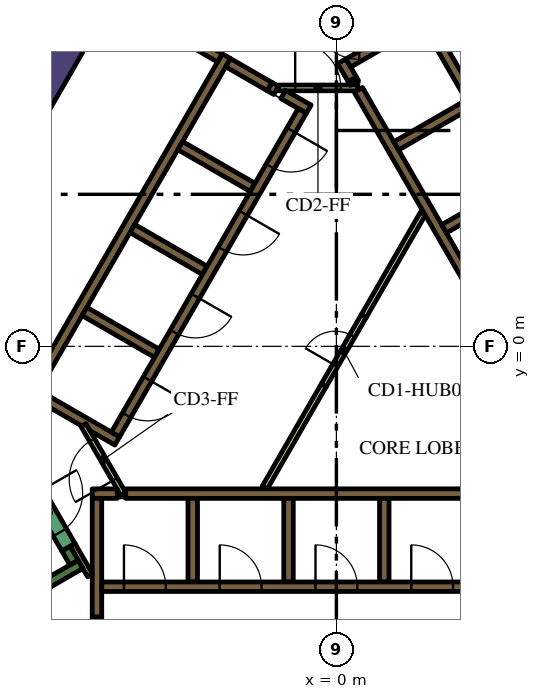
"""IFC4 building model, lengths in metres.
Left out: names, types, materials, properties, quantities, classifications, styles, units other than length and angle.
Written with IfcOpenShell. Run it as: python <this file> out.ifc"""

import sys

from ifc_helpers import new_model, si_unit, direction, frame, frame_2d, origin, place, context, subcontext, project, spatial, polyline, rectangle, outline, extrude, element, fill, save


model = new_model("IFC4")
c1 = context("Model", 3, precision=1e-05, world=origin(), true_north=direction((0.0, 1.0)))
c2 = subcontext(c1, "Body", "Model", "MODEL_VIEW")
j1 = project(units=[si_unit("LENGTHUNIT", "METRE"), si_unit("PLANEANGLEUNIT", "RADIAN")], contexts=[c1])
p1 = place(None, origin())
s1 = spatial("IfcSite", under=j1, at=p1, CompositionType="ELEMENT")
p2 = place(p1, origin())
s2 = spatial("IfcBuilding", under=s1, at=p2, CompositionType="ELEMENT")
p3 = place(p2, frame((0.0, 0.0, 158.4)))
s3 = spatial("IfcBuildingStorey", under=s2, at=p3, CompositionType="ELEMENT", Elevation=158.4)
p4 = place(p3, frame((8.279, 5.761, 0.0), z_axis=(0.0, 0.0, 1.0), x_axis=(-0.500010359015, 0.866019422922, 0.0)))
e1 = element("IfcWall", 1, at=p4, inside=s3, PredefinedType="SOLIDWALL", context=c2, shape_type="SweptSolid", body=[
    extrude(rectangle(XDim=12.528, YDim=0.8, at=frame_2d((6.264, 0.0))), origin(), (0.0, 0.0, 1.0), 4.2),
])
p5 = place(p3, frame((-12.668, -1.842, 0.0), z_axis=(0.0, 0.0, 1.0), x_axis=(0.500003640647, 0.866023301845, 0.0)))
e2 = element("IfcWall", 2, at=p5, inside=s3, PredefinedType="SOLIDWALL", context=c2, shape_type="SweptSolid", body=[
    extrude(rectangle(XDim=15.858, YDim=0.8, at=frame_2d((7.929, 0.0))), origin(), (0.0, 0.0, 1.0), 4.2),
])
p6 = place(p3, frame((-12.84, -9.261, 0.0), z_axis=(0.0, 0.0, 1.0), x_axis=(0.866016039709, 0.500016218704, 0.0)))
e3 = element("IfcWall", 3, at=p6, inside=s3, PredefinedType="SOLIDWALL", context=c2, shape_type="SweptSolid", body=[
    extrude(rectangle(XDim=7.05, YDim=0.25, at=frame_2d((3.525, 0.0))), origin(), (0.0, 0.0, 1.0), 4.2),
])
p7 = place(p3, frame((-6.905, -5.69, 0.0), z_axis=(0.0, 0.0, 1.0), x_axis=(-0.500402024738, 0.865793170242, 0.0)))
e4 = element("IfcWall", 4, at=p7, inside=s3, PredefinedType="SOLIDWALL", context=c2, shape_type="SweptSolid", body=[
    extrude(rectangle(XDim=0.425, YDim=0.25, at=frame_2d((0.212, 0.0))), origin(), (0.0, 0.0, 1.0), 4.2),
])
p8 = place(p3, frame((-5.545, -3.875, 0.0), z_axis=(0.0, 0.0, 1.0), x_axis=(1.0, 0.0, 0.0)))
e5 = element("IfcWall", 5, at=p8, inside=s3, PredefinedType="SOLIDWALL", context=c2, shape_type="SweptSolid", body=[
    extrude(rectangle(XDim=11.97, YDim=0.25, at=frame_2d((5.985, 0.0))), origin(), (0.0, 0.0, 1.0), 4.2),
])
p9 = place(p3, frame((-6.425, -3.875, 0.0), z_axis=(0.0, 0.0, 1.0), x_axis=(1.0, 0.0, 0.0)))
e6 = element("IfcWall", 6, at=p9, inside=s3, PredefinedType="SOLIDWALL", context=c2, shape_type="SweptSolid", body=[
    extrude(rectangle(XDim=0.658, YDim=0.25, at=frame_2d((0.329, 0.0))), origin(), (0.0, 0.0, 1.0), 4.2),
])
for number, where, z_axis, x_axis in (
    (7, (1.26, -4.0, 0.0), (0.0, 0.0, 1.0), (0.0, -1.0, 0.0)),
    (8, (-1.26, -4.0, 0.0), (0.0, 0.0, 1.0), (0.0, -1.0, 0.0)),
    (9, (-3.78, -4.0, 0.0), (0.0, 0.0, 1.0), (0.0, -1.0, 0.0)),
):
    element("IfcWall", number, at=place(p3, frame(where, z_axis=z_axis, x_axis=x_axis)), inside=s3, PredefinedType="SOLIDWALL", context=c2, shape_type="SweptSolid", body=[
        extrude(rectangle(XDim=2.2, YDim=0.25, at=frame_2d((1.1, 0.0))), origin(), (0.0, 0.0, 1.0), 4.2),
    ])
p10 = place(p3, frame((-6.3, -7.125, 0.0), z_axis=(0.0, 0.0, 1.0), x_axis=(0.0, 1.0, 0.0)))
e10 = element("IfcWall", 10, at=p10, inside=s3, PredefinedType="SOLIDWALL", context=c2, shape_type="SweptSolid", body=[
    extrude(rectangle(XDim=3.125, YDim=0.25, at=frame_2d((1.562, 0.0))), origin(), (0.0, 0.0, 1.0), 4.2),
])
p11 = place(p3, frame((0.473, 6.93, 0.0), z_axis=(0.0, 0.0, 1.0), x_axis=(-0.49972245349, 0.866185586049, 0.0)))
e11 = element("IfcWall", 11, at=p11, inside=s3, PredefinedType="SOLIDWALL", context=c2, shape_type="SweptSolid", body=[
    extrude(rectangle(XDim=0.11, YDim=0.25, at=frame_2d((0.055, 0.0))), origin(), (0.0, 0.0, 1.0), 4.2),
])
p12 = place(p3, frame((6.568, -3.627, 0.0), z_axis=(0.0, 0.0, 1.0), x_axis=(-0.499999455981, 0.866025717874, 0.0)))
e12 = element("IfcWall", 12, at=p12, inside=s3, PredefinedType="SOLIDWALL", context=c2, shape_type="SweptSolid", body=[
    extrude(rectangle(XDim=11.978, YDim=0.25, at=frame_2d((5.989, 0.0))), origin(), (0.0, 0.0, 1.0), 4.2),
])
p13 = place(p3, frame((0.417, 7.027, 0.0), z_axis=(0.0, 0.0, 1.0), x_axis=(-0.500210807569, 0.865903659763, 0.0)))
e13 = element("IfcWall", 13, at=p13, inside=s3, PredefinedType="SOLIDWALL", context=c2, shape_type="SweptSolid", body=[
    extrude(rectangle(XDim=0.548, YDim=0.25, at=frame_2d((0.274, 0.0))), origin(), (0.0, 0.0, 1.0), 4.2),
])
p14 = place(p3, frame((3.1, 9.064, 0.0), z_axis=(0.0, 0.0, 1.0), x_axis=(-0.866030133475, -0.499991807846, 0.0)))
e14 = element("IfcWall", 14, at=p14, inside=s3, PredefinedType="SOLIDWALL", context=c2, shape_type="SweptSolid", body=[
    extrude(rectangle(XDim=3.217, YDim=0.25, at=frame_2d((1.608, 0.0))), origin(), (0.0, 0.0, 1.0), 4.2),
])
p15 = place(p3, frame((1.574, 5.274, 0.0), z_axis=(0.0, 0.0, 1.0), x_axis=(0.866028486751, 0.499994660107, 0.0)))
e15 = element("IfcWall", 15, at=p15, inside=s3, PredefinedType="SOLIDWALL", context=c2, shape_type="SweptSolid", body=[
    extrude(rectangle(XDim=2.2, YDim=0.25, at=frame_2d((1.1, 0.0))), origin(), (0.0, 0.0, 1.0), 4.2),
])
p16 = place(p3, frame((2.834, 3.091, 0.0), z_axis=(0.0, 0.0, 1.0), x_axis=(0.866008176907, 0.50002983664, 0.0)))
e16 = element("IfcWall", 16, at=p16, inside=s3, PredefinedType="SOLIDWALL", context=c2, shape_type="SweptSolid", body=[
    extrude(rectangle(XDim=2.2, YDim=0.25, at=frame_2d((1.1, 0.0))), origin(), (0.0, 0.0, 1.0), 4.2),
])
p17 = place(p3, frame((-8.06, -1.311, 0.0), z_axis=(0.0, 0.0, 1.0), x_axis=(0.50000273126, 0.866023826885, 0.0)))
e17 = element("IfcWall", 17, at=p17, inside=s3, PredefinedType="SOLIDWALL", context=c2, shape_type="SweptSolid", body=[
    extrude(rectangle(XDim=10.33, YDim=0.25, at=frame_2d((5.165, 0.0))), origin(), (0.0, 0.0, 1.0), 4.2),
])
p18 = place(p3, frame((-1.758, 6.835, 0.0), z_axis=(0.0, 0.0, 1.0), x_axis=(0.865982457891, -0.500074377092, 0.0)))
e18 = element("IfcWall", 18, at=p18, inside=s3, PredefinedType="SOLIDWALL", context=c2, shape_type="SweptSolid", body=[
    extrude(rectangle(XDim=0.2, YDim=0.25, at=frame_2d((0.1, 0.0))), origin(), (0.0, 0.0, 1.0), 4.2),
])
p19 = place(p3, frame((-1.76, 6.836, 0.0), z_axis=(0.0, 0.0, 1.0), x_axis=(-0.865952863304, 0.500125622755, 0.0)))
e19 = element("IfcWall", 19, at=p19, inside=s3, PredefinedType="SOLIDWALL", context=c2, shape_type="SweptSolid", body=[
    extrude(rectangle(XDim=1.258, YDim=0.25, at=frame_2d((0.629, 0.0))), origin(), (0.0, 0.0, 1.0), 4.2),
])
p20 = place(p3, frame((-0.728, 6.24, 0.0), z_axis=(0.0, 0.0, 1.0), x_axis=(-0.865955664968, 0.500120771724, 0.0)))
e20 = element("IfcWall", 20, at=p20, inside=s3, PredefinedType="SOLIDWALL", context=c2, shape_type="SweptSolid", body=[
    extrude(rectangle(XDim=0.778, YDim=0.25, at=frame_2d((0.389, 0.0))), origin(), (0.0, 0.0, 1.0), 4.2),
])
for number, where, z_axis, x_axis in (
    (21, (-2.204, 4.182, 0.0), (0.0, 0.0, 1.0), (-0.866, 0.5, 0.0)),
    (22, (-5.369, 3.1, 0.0), (0.0, 0.0, 1.0), (0.866, -0.5, 0.0)),
    (23, (-4.724, -0.182, 0.0), (0.0, 0.0, 1.0), (-0.866, 0.5, 0.0)),
):
    element("IfcWall", number, at=place(p3, frame(where, z_axis=z_axis, x_axis=x_axis)), inside=s3, PredefinedType="SOLIDWALL", context=c2, shape_type="SweptSolid", body=[
        extrude(rectangle(XDim=2.2, YDim=0.25, at=frame_2d((1.1, 0.0))), origin(), (0.0, 0.0, 1.0), 4.2),
    ])
p21 = place(p3, origin())
e24 = element("IfcWall", 24, at=p21, inside=s3, PredefinedType="SOLIDWALL", context=c2, shape_type="SweptSolid", body=[
    extrude(outline(polyline([(-5.922, -2.257), (-5.922, -2.257), (-5.705, -2.382), (-5.83, -2.598), (-6.483, -2.221), (-6.591, -2.033), (-6.591, -2.033), (-6.7, -2.096), (-7.952, -1.373), (-7.827, -1.156), (-5.922, -2.257)])), origin(), (0.0, 0.0, 1.0), 4.2),
])
p22 = place(p3, frame((-3.066, 7.59, 0.0), z_axis=(0.0, 0.0, 1.0), x_axis=(-0.866081358704, 0.49990307071, 0.0)))
e25 = element("IfcWall", 25, at=p22, inside=s3, PredefinedType="SOLIDWALL", context=c2, shape_type="SweptSolid", body=[
    extrude(rectangle(XDim=0.858, YDim=0.25, at=frame_2d((0.429, 0.0))), origin(), (0.0, 0.0, 1.0), 4.2),
])
p23 = place(p3, frame((-6.48, -6.027, 0.0), z_axis=(0.0, 0.0, 1.0), x_axis=(-0.499927229454, 0.866067413802, 0.0)))
e26 = element("IfcWall", 26, at=p23, inside=s3, PredefinedType="PARTITIONING", context=c2, shape_type="SweptSolid", body=[
    extrude(rectangle(XDim=0.929, YDim=0.15, at=frame_2d((0.464, 0.0))), origin(), (0.0, 0.0, 1.0), 4.2),
])
p24 = place(p3, frame((-1.887, -3.718, 0.0), z_axis=(0.0, 0.0, 1.0), x_axis=(0.500043732237, 0.866000153493, 0.0)))
e27 = element("IfcWall", 27, at=p24, inside=s3, PredefinedType="PARTITIONING", context=c2, shape_type="SweptSolid", body=[
    extrude(rectangle(XDim=3.114, YDim=0.15, at=frame_2d((1.557, 0.0))), origin(), (0.0, 0.0, 1.0), 3.15),
])
p25 = place(p3, frame((0.72, 0.797, 0.0), z_axis=(0.0, 0.0, 1.0), x_axis=(0.499984921984, 0.866034108906, 0.0)))
e28 = element("IfcWall", 28, at=p25, inside=s3, PredefinedType="PARTITIONING", context=c2, shape_type="SweptSolid", body=[
    extrude(rectangle(XDim=3.113, YDim=0.15, at=frame_2d((1.557, 0.0))), origin(), (0.0, 0.0, 1.0), 3.15),
])
p26 = place(p3, frame((-6.175, -6.325, 0.0), z_axis=(0.0, 0.0, 1.0), x_axis=(1.0, 0.0, 0.0)))
e29 = element("IfcWall", 29, at=p26, inside=s3, PredefinedType="SOLIDWALL", context=c2, shape_type="SweptSolid", body=[
    extrude(rectangle(XDim=12.35, YDim=0.25, at=frame_2d((6.175, 0.0))), origin(), (0.0, 0.0, 1.0), 4.2),
])
p27 = place(p26, frame((0.585, 0.0, 0.0)))
e30 = element("IfcOpeningElement", 30, at=p27, cuts=e29, PredefinedType="OPENING", context=c2, shape_type="SweptSolid", body=[
    extrude(rectangle(XDim=1.1, YDim=2.1, at=frame_2d((0.55, 1.05))), frame((0.0, 0.135, 0.0), z_axis=(0.0, -1.0, 0.0), x_axis=(1.0, 0.0, 0.0)), (0.0, 0.0, 1.0), 0.27),
])
p28 = place(p26, frame((3.105, 0.0, 0.0)))
e31 = element("IfcOpeningElement", 31, at=p28, cuts=e29, PredefinedType="OPENING", context=c2, shape_type="SweptSolid", body=[
    extrude(rectangle(XDim=1.1, YDim=2.1, at=frame_2d((0.55, 1.05))), frame((0.0, 0.135, 0.0), z_axis=(0.0, -1.0, 0.0), x_axis=(1.0, 0.0, 0.0)), (0.0, 0.0, 1.0), 0.27),
])
p29 = place(p26, frame((5.625, 0.0, 0.0)))
e32 = element("IfcOpeningElement", 32, at=p29, cuts=e29, PredefinedType="OPENING", context=c2, shape_type="SweptSolid", body=[
    extrude(rectangle(XDim=1.1, YDim=2.1, at=frame_2d((0.55, 1.05))), frame((0.0, 0.135, 0.0), z_axis=(0.0, -1.0, 0.0), x_axis=(1.0, 0.0, 0.0)), (0.0, 0.0, 1.0), 0.27),
])
p30 = place(p26, frame((8.145, 0.0, 0.0)))
e33 = element("IfcOpeningElement", 33, at=p30, cuts=e29, PredefinedType="OPENING", context=c2, shape_type="SweptSolid", body=[
    extrude(rectangle(XDim=1.1, YDim=2.1, at=frame_2d((0.55, 1.05))), frame((0.0, 0.135, 0.0), z_axis=(0.0, -1.0, 0.0), x_axis=(1.0, 0.0, 0.0)), (0.0, 0.0, 1.0), 0.27),
])
p31 = place(p26, frame((10.665, 0.0, 0.0)))
e34 = element("IfcOpeningElement", 34, at=p31, cuts=e29, PredefinedType="OPENING", context=c2, shape_type="SweptSolid", body=[
    extrude(rectangle(XDim=1.1, YDim=2.1, at=frame_2d((0.55, 1.05))), frame((0.0, 0.135, 0.0), z_axis=(0.0, -1.0, 0.0), x_axis=(1.0, 0.0, 0.0)), (0.0, 0.0, 1.0), 0.27),
])
p32 = place(p3, frame((8.565, -2.185, 0.0), z_axis=(0.0, 0.0, 1.0), x_axis=(-0.499997954832, 0.866026584559, 0.0)))
e35 = element("IfcWall", 35, at=p32, inside=s3, PredefinedType="SOLIDWALL", context=c2, shape_type="SweptSolid", body=[
    extrude(rectangle(XDim=12.35, YDim=0.25, at=frame_2d((6.175, 0.0))), origin(), (0.0, 0.0, 1.0), 4.2),
])
p33 = place(p32, frame((0.585, 0.0, 0.0)))
e36 = element("IfcOpeningElement", 36, at=p33, cuts=e35, PredefinedType="OPENING", context=c2, shape_type="SweptSolid", body=[
    extrude(rectangle(XDim=1.1, YDim=2.1, at=frame_2d((0.55, 1.05))), frame((0.0, 0.135, 0.0), z_axis=(0.0, -1.0, 0.0), x_axis=(1.0, 0.0, 0.0)), (0.0, 0.0, 1.0), 0.27),
])
p34 = place(p3, frame((-0.898, 6.194, 0.0), z_axis=(0.0, 0.0, 1.0), x_axis=(-0.499996202215, -0.866027596426, 0.0)))
e37 = element("IfcWall", 37, at=p34, inside=s3, PredefinedType="SOLIDWALL", context=c2, shape_type="SweptSolid", body=[
    extrude(rectangle(XDim=9.83, YDim=0.25, at=frame_2d((4.915, 0.0))), origin(), (0.0, 0.0, 1.0), 4.2),
])
p35 = place(p34, frame((0.585, 0.0, 0.0)))
e38 = element("IfcOpeningElement", 38, at=p35, cuts=e37, PredefinedType="OPENING", context=c2, shape_type="SweptSolid", body=[
    extrude(rectangle(XDim=1.1, YDim=2.1, at=frame_2d((0.55, 1.05))), frame((0.0, 0.135, 0.0), z_axis=(0.0, -1.0, 0.0), x_axis=(1.0, 0.0, 0.0)), (0.0, 0.0, 1.0), 0.27),
])
p36 = place(p34, frame((3.105, 0.0, 0.0)))
e39 = element("IfcOpeningElement", 39, at=p36, cuts=e37, PredefinedType="OPENING", context=c2, shape_type="SweptSolid", body=[
    extrude(rectangle(XDim=1.1, YDim=2.1, at=frame_2d((0.55, 1.05))), frame((0.0, 0.135, 0.0), z_axis=(0.0, -1.0, 0.0), x_axis=(1.0, 0.0, 0.0)), (0.0, 0.0, 1.0), 0.27),
])
p37 = place(p34, frame((5.625, 0.0, 0.0)))
e40 = element("IfcOpeningElement", 40, at=p37, cuts=e37, PredefinedType="OPENING", context=c2, shape_type="SweptSolid", body=[
    extrude(rectangle(XDim=1.1, YDim=2.1, at=frame_2d((0.55, 1.05))), frame((0.0, 0.135, 0.0), z_axis=(0.0, -1.0, 0.0), x_axis=(1.0, 0.0, 0.0)), (0.0, 0.0, 1.0), 0.27),
])
p38 = place(p34, frame((8.145, 0.0, 0.0)))
e41 = element("IfcOpeningElement", 41, at=p38, cuts=e37, PredefinedType="OPENING", context=c2, shape_type="SweptSolid", body=[
    extrude(rectangle(XDim=1.1, YDim=2.1, at=frame_2d((0.55, 1.05))), frame((0.0, 0.135, 0.0), z_axis=(0.0, -1.0, 0.0), x_axis=(1.0, 0.0, 0.0)), (0.0, 0.0, 1.0), 0.27),
])
p39 = place(p3, frame((-8.103, -3.466, 0.0), z_axis=(0.0, 0.0, 1.0), x_axis=(0.500078061341, -0.865980330357, 0.0)))
e42 = element("IfcWall", 42, at=p39, inside=s3, PredefinedType="SOLIDWALL", context=c2, shape_type="SweptSolid", body=[
    extrude(rectangle(XDim=2.1, YDim=0.4, at=frame_2d((1.05, 0.0))), origin(), (0.0, 0.0, 1.0), 4.2),
])
p40 = place(p39, frame((0.45, 0.0, 0.0)))
e43 = element("IfcOpeningElement", 43, at=p40, cuts=e42, PredefinedType="OPENING", context=c2, shape_type="SweptSolid", body=[
    extrude(rectangle(XDim=1.2, YDim=2.1, at=frame_2d((0.6, 1.05))), frame((0.0, 0.21, 0.0), z_axis=(0.0, -1.0, 0.0), x_axis=(1.0, 0.0, 0.0)), (0.0, 0.0, 1.0), 0.42),
])
p41 = place(p3, frame((-6.3, -7.125, 0.0), z_axis=(0.0, 0.0, 1.0), x_axis=(0.0, -1.0, 0.0)))
e44 = element("IfcWall", 44, at=p41, inside=s3, PredefinedType="SOLIDWALL", context=c2, shape_type="SweptSolid", body=[
    extrude(rectangle(XDim=1.8, YDim=0.25, at=frame_2d((0.9, 0.0))), origin(), (0.0, 0.0, 1.0), 4.2),
])
p42 = place(p41, frame((0.45, 0.0, 0.0)))
e45 = element("IfcOpeningElement", 45, at=p42, cuts=e44, PredefinedType="OPENING", context=c2, shape_type="SweptSolid", body=[
    extrude(rectangle(XDim=0.9, YDim=2.1, at=frame_2d((0.45, 1.05))), frame((0.0, 0.135, 0.0), z_axis=(0.0, -1.0, 0.0), x_axis=(1.0, 0.0, 0.0)), (0.0, 0.0, 1.0), 0.27),
])
p43 = place(p3, frame((-0.33, -1.022, 0.0), z_axis=(0.0, 0.0, 1.0), x_axis=(0.500027713859, 0.866009402589, 0.0)))
e46 = element("IfcWall", 46, at=p43, inside=s3, PredefinedType="PARTITIONING", context=c2, shape_type="SweptSolid", body=[
    extrude(rectangle(XDim=2.1, YDim=0.15, at=frame_2d((1.05, 0.0))), origin(), (0.0, 0.0, 1.0), 3.15),
])
p44 = place(p43, frame((0.6, 0.0, 0.0)))
e47 = element("IfcOpeningElement", 47, at=p44, cuts=e46, PredefinedType="OPENING", context=c2, shape_type="SweptSolid", body=[
    extrude(rectangle(XDim=0.9, YDim=2.1, at=frame_2d((0.45, 1.05))), frame((0.0, 0.085, 0.0), z_axis=(0.0, -1.0, 0.0), x_axis=(1.0, 0.0, 0.0)), (0.0, 0.0, 1.0), 0.17),
])
p45 = place(p3, frame((-1.534, 6.8, 0.0), z_axis=(0.0, 0.0, 1.0), x_axis=(1.0, 0.0, 0.0)))
e48 = element("IfcWall", 48, at=p45, inside=s3, PredefinedType="PARTITIONING", context=c2, shape_type="SweptSolid", body=[
    extrude(rectangle(XDim=2.1, YDim=0.15, at=frame_2d((1.05, 0.0))), origin(), (0.0, 0.0, 1.0), 3.15),
])
p46 = place(p45, frame((0.45, 0.0, 0.0)))
e49 = element("IfcOpeningElement", 49, at=p46, cuts=e48, PredefinedType="OPENING", context=c2, shape_type="SweptSolid", body=[
    extrude(rectangle(XDim=1.2, YDim=2.1, at=frame_2d((0.6, 1.05))), frame((0.0, 0.085, 0.0), z_axis=(0.0, -1.0, 0.0), x_axis=(1.0, 0.0, 0.0)), (0.0, 0.0, 1.0), 0.17),
])
p47 = place(p3, frame((-5.606, -3.89, 0.0), z_axis=(0.0, 0.0, 1.0), x_axis=(-0.500027713859, 0.866009402589, 0.0)))
e50 = element("IfcWall", 50, at=p47, inside=s3, PredefinedType="PARTITIONING", context=c2, shape_type="SweptSolid", body=[
    extrude(rectangle(XDim=2.1, YDim=0.15, at=frame_2d((1.05, 0.0))), origin(), (0.0, 0.0, 1.0), 3.15),
])
p48 = place(p47, frame((0.45, 0.0, 0.0)))
e51 = element("IfcOpeningElement", 51, at=p48, cuts=e50, PredefinedType="OPENING", context=c2, shape_type="SweptSolid", body=[
    extrude(rectangle(XDim=1.2, YDim=2.1, at=frame_2d((0.6, 1.05))), frame((0.0, 0.085, 0.0), z_axis=(0.0, -1.0, 0.0), x_axis=(1.0, 0.0, 0.0)), (0.0, 0.0, 1.0), 0.17),
])
p49 = place(p27, origin())
e52 = element("IfcDoor", 52, at=p49, inside=s3, OperationType="DOUBLE_DOOR_SLIDING", PredefinedType="DOOR", context=c2, shape_type="SweptSolid", body=[
    extrude(rectangle(XDim=1.1, YDim=2.1, at=frame_2d((0.55, 1.05))), frame((0.0, 0.025, 0.0), z_axis=(0.0, -1.0, 0.0), x_axis=(1.0, 0.0, 0.0)), (0.0, 0.0, 1.0), 0.05),
])
fill(e30, e52)
p50 = place(p28, origin())
e53 = element("IfcDoor", 53, at=p50, inside=s3, OperationType="DOUBLE_DOOR_SLIDING", PredefinedType="DOOR", context=c2, shape_type="SweptSolid", body=[
    extrude(rectangle(XDim=1.1, YDim=2.1, at=frame_2d((0.55, 1.05))), frame((0.0, 0.025, 0.0), z_axis=(0.0, -1.0, 0.0), x_axis=(1.0, 0.0, 0.0)), (0.0, 0.0, 1.0), 0.05),
])
fill(e31, e53)
p51 = place(p29, origin())
e54 = element("IfcDoor", 54, at=p51, inside=s3, OperationType="DOUBLE_DOOR_SLIDING", PredefinedType="DOOR", context=c2, shape_type="SweptSolid", body=[
    extrude(rectangle(XDim=1.1, YDim=2.1, at=frame_2d((0.55, 1.05))), frame((0.0, 0.025, 0.0), z_axis=(0.0, -1.0, 0.0), x_axis=(1.0, 0.0, 0.0)), (0.0, 0.0, 1.0), 0.05),
])
fill(e32, e54)
p52 = place(p30, origin())
e55 = element("IfcDoor", 55, at=p52, inside=s3, OperationType="DOUBLE_DOOR_SLIDING", PredefinedType="DOOR", context=c2, shape_type="SweptSolid", body=[
    extrude(rectangle(XDim=1.1, YDim=2.1, at=frame_2d((0.55, 1.05))), frame((0.0, 0.025, 0.0), z_axis=(0.0, -1.0, 0.0), x_axis=(1.0, 0.0, 0.0)), (0.0, 0.0, 1.0), 0.05),
])
fill(e33, e55)
p53 = place(p35, origin())
e56 = element("IfcDoor", 56, at=p53, inside=s3, OperationType="DOUBLE_DOOR_SLIDING", PredefinedType="DOOR", context=c2, shape_type="SweptSolid", body=[
    extrude(rectangle(XDim=1.1, YDim=2.1, at=frame_2d((0.55, 1.05))), frame((0.0, 0.025, 0.0), z_axis=(0.0, -1.0, 0.0), x_axis=(1.0, 0.0, 0.0)), (0.0, 0.0, 1.0), 0.05),
])
fill(e38, e56)
p54 = place(p36, origin())
e57 = element("IfcDoor", 57, at=p54, inside=s3, OperationType="DOUBLE_DOOR_SLIDING", PredefinedType="DOOR", context=c2, shape_type="SweptSolid", body=[
    extrude(rectangle(XDim=1.1, YDim=2.1, at=frame_2d((0.55, 1.05))), frame((0.0, 0.025, 0.0), z_axis=(0.0, -1.0, 0.0), x_axis=(1.0, 0.0, 0.0)), (0.0, 0.0, 1.0), 0.05),
])
fill(e39, e57)
p55 = place(p37, origin())
e58 = element("IfcDoor", 58, at=p55, inside=s3, OperationType="DOUBLE_DOOR_SLIDING", PredefinedType="DOOR", context=c2, shape_type="SweptSolid", body=[
    extrude(rectangle(XDim=1.1, YDim=2.1, at=frame_2d((0.55, 1.05))), frame((0.0, 0.025, 0.0), z_axis=(0.0, -1.0, 0.0), x_axis=(1.0, 0.0, 0.0)), (0.0, 0.0, 1.0), 0.05),
])
fill(e40, e58)
p56 = place(p38, origin())
e59 = element("IfcDoor", 59, at=p56, inside=s3, OperationType="DOUBLE_DOOR_SLIDING", PredefinedType="DOOR", context=c2, shape_type="SweptSolid", body=[
    extrude(rectangle(XDim=1.1, YDim=2.1, at=frame_2d((0.55, 1.05))), frame((0.0, 0.025, 0.0), z_axis=(0.0, -1.0, 0.0), x_axis=(1.0, 0.0, 0.0)), (0.0, 0.0, 1.0), 0.05),
])
fill(e41, e59)
p57 = place(p40, origin())
e60 = element("IfcDoor", 60, at=p57, inside=s3, OperationType="SINGLE_SWING_LEFT", PredefinedType="DOOR", context=c2, shape_type="SweptSolid", body=[
    extrude(rectangle(XDim=1.2, YDim=2.1, at=frame_2d((0.6, 1.05))), frame((0.0, 0.025, 0.0), z_axis=(0.0, -1.0, 0.0), x_axis=(1.0, 0.0, 0.0)), (0.0, 0.0, 1.0), 0.05),
])
fill(e43, e60)
p58 = place(p44, origin())
e61 = element("IfcDoor", 61, at=p58, inside=s3, OperationType="SINGLE_SWING_LEFT", PredefinedType="DOOR", context=c2, shape_type="SweptSolid", body=[
    extrude(rectangle(XDim=0.9, YDim=2.1, at=frame_2d((0.45, 1.05))), frame((0.0, 0.025, 0.0), z_axis=(0.0, -1.0, 0.0), x_axis=(1.0, 0.0, 0.0)), (0.0, 0.0, 1.0), 0.05),
])
fill(e47, e61)
p59 = place(p46, origin())
e62 = element("IfcDoor", 62, at=p59, inside=s3, OperationType="SINGLE_SWING_LEFT", PredefinedType="DOOR", context=c2, shape_type="SweptSolid", body=[
    extrude(rectangle(XDim=1.2, YDim=2.1, at=frame_2d((0.6, 1.05))), frame((0.0, 0.025, 0.0), z_axis=(0.0, -1.0, 0.0), x_axis=(1.0, 0.0, 0.0)), (0.0, 0.0, 1.0), 0.05),
])
fill(e49, e62)
p60 = place(p48, origin())
e63 = element("IfcDoor", 63, at=p60, inside=s3, OperationType="SINGLE_SWING_LEFT", PredefinedType="DOOR", context=c2, shape_type="SweptSolid", body=[
    extrude(rectangle(XDim=1.2, YDim=2.1, at=frame_2d((0.6, 1.05))), frame((0.0, 0.025, 0.0), z_axis=(0.0, -1.0, 0.0), x_axis=(1.0, 0.0, 0.0)), (0.0, 0.0, 1.0), 0.05),
])
fill(e51, e63)
save(model, sys.argv[1])
